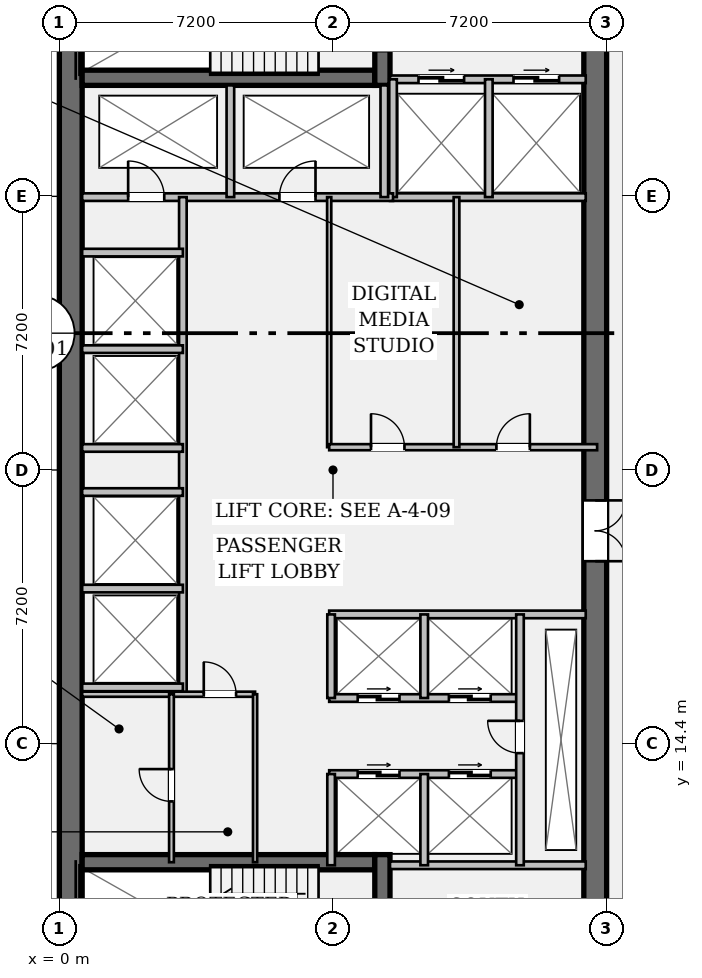
"""IFC4 building model, lengths in metres.
Left out: names, types, materials, properties, quantities, classifications, styles, units other than length and angle.
Written with IfcOpenShell. Run it as: python <this file> out.ifc"""

import sys

from ifc_helpers import new_model, si_unit, direction, frame, frame_2d, origin, place, context, subcontext, project, spatial, rectangle, extrude, element, fill, save


model = new_model("IFC4")
c1 = context("Model", 3, precision=1e-05, world=origin(), true_north=direction((0.0, 1.0)))
c2 = subcontext(c1, "Body", "Model", "MODEL_VIEW")
j1 = project(units=[si_unit("LENGTHUNIT", "METRE"), si_unit("PLANEANGLEUNIT", "RADIAN")], contexts=[c1])
p1 = place(None, origin())
s1 = spatial("IfcSite", under=j1, at=p1, CompositionType="ELEMENT")
p2 = place(p1, origin())
s2 = spatial("IfcBuilding", under=s1, at=p2, CompositionType="ELEMENT")
p3 = place(p2, frame((0.0, 0.0, 152.25)))
s3 = spatial("IfcBuildingStorey", under=s2, at=p3, CompositionType="ELEMENT", Elevation=152.25)
p4 = place(p3, frame((0.3, 7.2, 0.0), z_axis=(0.0, 0.0, 1.0), x_axis=(0.0, 1.0, 0.0)))
e1 = element("IfcWall", 1, at=p4, inside=s3, PredefinedType="SHEAR", context=c2, shape_type="SweptSolid", body=[
    extrude(rectangle(XDim=28.8, YDim=0.6, at=frame_2d((14.4, 0.0))), origin(), (0.0, 0.0, 1.0), 3.58),
])
p5 = place(p3, frame((14.1, 35.4, 0.0), z_axis=(0.0, 0.0, 1.0), x_axis=(0.0, -1.0, 0.0)))
e2 = element("IfcWall", 2, at=p5, inside=s3, PredefinedType="SHEAR", context=c2, shape_type="SweptSolid", body=[
    extrude(rectangle(XDim=27.6, YDim=0.6, at=frame_2d((13.8, 0.0))), origin(), (0.0, 0.0, 1.0), 3.58),
])
p6 = place(p5, frame((1.3, 0.0, 0.0)))
e3 = element("IfcOpeningElement", 3, at=p6, cuts=e2, PredefinedType="OPENING", context=c2, shape_type="SweptSolid", body=[
    extrude(rectangle(XDim=1.2, YDim=2.15, at=frame_2d((0.6, 1.075))), frame((0.0, 0.312, 0.0), z_axis=(0.0, -1.0, 0.0), x_axis=(1.0, 0.0, 0.0)), (0.0, 0.0, 1.0), 0.624),
])
p7 = place(p5, frame((25.25, 0.0, 0.0)))
e4 = element("IfcOpeningElement", 4, at=p7, cuts=e2, PredefinedType="OPENING", context=c2, shape_type="SweptSolid", body=[
    extrude(rectangle(XDim=1.2, YDim=2.15, at=frame_2d((0.6, 1.075))), frame((0.0, 0.312, 0.0), z_axis=(0.0, -1.0, 0.0), x_axis=(1.0, 0.0, 0.0)), (0.0, 0.0, 1.0), 0.624),
])
p8 = place(p5, frame((14.6, 0.0, 0.0)))
e5 = element("IfcOpeningElement", 5, at=p8, cuts=e2, PredefinedType="OPENING", context=c2, shape_type="SweptSolid", body=[
    extrude(rectangle(XDim=1.6, YDim=2.2, at=frame_2d((0.8, 1.1))), frame((0.0, 0.312, 0.0), z_axis=(0.0, -1.0, 0.0), x_axis=(1.0, 0.0, 0.0)), (0.0, 0.0, 1.0), 0.624),
])
for number, where, z_axis, x_axis in (
    (6, (0.6, 31.92, 0.0), (0.0, 0.0, 1.0), (1.0, 0.0, 0.0)),
    (7, (0.6, 11.28, 0.0), (0.0, 0.0, 1.0), (1.0, 0.0, 0.0)),
):
    element("IfcWall", number, at=place(p3, frame(where, z_axis=z_axis, x_axis=x_axis)), inside=s3, PredefinedType="SHEAR", context=c2, shape_type="SweptSolid", body=[
        extrude(rectangle(XDim=7.7, YDim=0.4, at=frame_2d((3.85, 0.0))), origin(), (0.0, 0.0, 1.0), 3.58),
    ])
p9 = place(p3, frame((8.5, 31.72, 0.0), z_axis=(0.0, 0.0, 1.0), x_axis=(0.0, 1.0, 0.0)))
e8 = element("IfcWall", 8, at=p9, inside=s3, PredefinedType="SHEAR", context=c2, shape_type="SweptSolid", body=[
    extrude(rectangle(XDim=3.68, YDim=0.4, at=frame_2d((1.84, 0.0))), origin(), (0.0, 0.0, 1.0), 3.58),
])
p10 = place(p9, frame((0.9, 0.0, 0.0)))
e9 = element("IfcOpeningElement", 9, at=p10, cuts=e8, PredefinedType="OPENING", context=c2, shape_type="SweptSolid", body=[
    extrude(rectangle(XDim=1.1, YDim=2.15, at=frame_2d((0.55, 1.075))), frame((0.0, 0.212, 0.0), z_axis=(0.0, -1.0, 0.0), x_axis=(1.0, 0.0, 0.0)), (0.0, 0.0, 1.0), 0.424),
])
p11 = place(p3, frame((8.5, 7.8, 0.0), z_axis=(0.0, 0.0, 1.0), x_axis=(0.0, 1.0, 0.0)))
e10 = element("IfcWall", 10, at=p11, inside=s3, PredefinedType="SHEAR", context=c2, shape_type="SweptSolid", body=[
    extrude(rectangle(XDim=3.68, YDim=0.4, at=frame_2d((1.84, 0.0))), origin(), (0.0, 0.0, 1.0), 3.58),
])
p12 = place(p11, frame((0.85, 0.0, 0.0)))
e11 = element("IfcOpeningElement", 11, at=p12, cuts=e10, PredefinedType="OPENING", context=c2, shape_type="SweptSolid", body=[
    extrude(rectangle(XDim=1.1, YDim=2.15, at=frame_2d((0.55, 1.075))), frame((0.0, 0.212, 0.0), z_axis=(0.0, -1.0, 0.0), x_axis=(1.0, 0.0, 0.0)), (0.0, 0.0, 1.0), 0.424),
])
p13 = place(p3, frame((8.7, 31.88, 0.0), z_axis=(0.0, 0.0, 1.0), x_axis=(1.0, 0.0, 0.0)))
e12 = element("IfcWall", 12, at=p13, inside=s3, PredefinedType="PARTITIONING", context=c2, shape_type="SweptSolid", body=[
    extrude(rectangle(XDim=5.15, YDim=0.2, at=frame_2d((2.575, 0.0))), origin(), (0.0, 0.0, 1.0), 3.58),
])
p14 = place(p13, frame((0.75, 0.0, 0.0)))
e13 = element("IfcOpeningElement", 13, at=p14, cuts=e12, PredefinedType="OPENING", context=c2, shape_type="SweptSolid", body=[
    extrude(rectangle(XDim=1.2, YDim=2.2, at=frame_2d((0.6, 1.1))), frame((0.0, 0.112, 0.0), z_axis=(0.0, -1.0, 0.0), x_axis=(1.0, 0.0, 0.0)), (0.0, 0.0, 1.0), 0.224),
])
p15 = place(p13, frame((3.25, 0.0, 0.0)))
e14 = element("IfcOpeningElement", 14, at=p15, cuts=e12, PredefinedType="OPENING", context=c2, shape_type="SweptSolid", body=[
    extrude(rectangle(XDim=1.2, YDim=2.2, at=frame_2d((0.6, 1.1))), frame((0.0, 0.112, 0.0), z_axis=(0.0, -1.0, 0.0), x_axis=(1.0, 0.0, 0.0)), (0.0, 0.0, 1.0), 0.224),
])
for number, where, z_axis, x_axis in (
    (15, (8.7, 11.2, 0.0), (0.0, 0.0, 1.0), (1.0, 0.0, 0.0)),
    (16, (8.7, 28.78, 0.0), (0.0, 0.0, 1.0), (1.0, 0.0, 0.0)),
):
    element("IfcWall", number, at=place(p3, frame(where, z_axis=z_axis, x_axis=x_axis)), inside=s3, PredefinedType="PARTITIONING", context=c2, shape_type="SweptSolid", body=[
        extrude(rectangle(XDim=5.15, YDim=0.2, at=frame_2d((2.575, 0.0))), origin(), (0.0, 0.0, 1.0), 3.58),
    ])
for number, where, z_axis, x_axis in (
    (17, (8.78, 28.78, 0.0), (0.0, 0.0, 1.0), (0.0, 1.0, 0.0)),
    (18, (11.3, 28.78, 0.0), (0.0, 0.0, 1.0), (0.0, 1.0, 0.0)),
):
    element("IfcWall", number, at=place(p3, frame(where, z_axis=z_axis, x_axis=x_axis)), inside=s3, PredefinedType="PARTITIONING", context=c2, shape_type="SweptSolid", body=[
        extrude(rectangle(XDim=3.1, YDim=0.2, at=frame_2d((1.55, 0.0))), origin(), (0.0, 0.0, 1.0), 3.58),
    ])
p16 = place(p3, frame((0.6, 28.78, 0.0), z_axis=(0.0, 0.0, 1.0), x_axis=(1.0, 0.0, 0.0)))
e19 = element("IfcWall", 19, at=p16, inside=s3, PredefinedType="PARTITIONING", context=c2, shape_type="SweptSolid", body=[
    extrude(rectangle(XDim=8.18, YDim=0.2, at=frame_2d((4.09, 0.0))), origin(), (0.0, 0.0, 1.0), 3.58),
])
p17 = place(p16, frame((1.21, 0.0, 0.0)))
e20 = element("IfcOpeningElement", 20, at=p17, cuts=e19, PredefinedType="OPENING", context=c2, shape_type="SweptSolid", body=[
    extrude(rectangle(XDim=0.95, YDim=2.15, at=frame_2d((0.475, 1.075))), frame((0.0, 0.112, 0.0), z_axis=(0.0, -1.0, 0.0), x_axis=(1.0, 0.0, 0.0)), (0.0, 0.0, 1.0), 0.224),
])
p18 = place(p16, frame((5.19, 0.0, 0.0)))
e21 = element("IfcOpeningElement", 21, at=p18, cuts=e19, PredefinedType="OPENING", context=c2, shape_type="SweptSolid", body=[
    extrude(rectangle(XDim=0.95, YDim=2.15, at=frame_2d((0.475, 1.075))), frame((0.0, 0.112, 0.0), z_axis=(0.0, -1.0, 0.0), x_axis=(1.0, 0.0, 0.0)), (0.0, 0.0, 1.0), 0.224),
])
for number, where, z_axis, x_axis in (
    (22, (4.5, 28.78, 0.0), (0.0, 0.0, 1.0), (0.0, 1.0, 0.0)),
    (23, (8.55, 28.78, 0.0), (0.0, 0.0, 1.0), (0.0, 1.0, 0.0)),
):
    element("IfcWall", number, at=place(p3, frame(where, z_axis=z_axis, x_axis=x_axis)), inside=s3, PredefinedType="PARTITIONING", context=c2, shape_type="SweptSolid", body=[
        extrude(rectangle(XDim=2.94, YDim=0.2, at=frame_2d((1.47, 0.0))), origin(), (0.0, 0.0, 1.0), 3.58),
    ])
p19 = place(p3, frame((3.25, 15.7, 0.0), z_axis=(0.0, 0.0, 1.0), x_axis=(0.0, 1.0, 0.0)))
e24 = element("IfcWall", 24, at=p19, inside=s3, PredefinedType="PARTITIONING", context=c2, shape_type="SweptSolid", body=[
    extrude(rectangle(XDim=13.08, YDim=0.2, at=frame_2d((6.54, 0.0))), origin(), (0.0, 0.0, 1.0), 3.58),
])
for number, where, z_axis, x_axis in (
    (25, (0.6, 15.88, 0.0), (0.0, 0.0, 1.0), (1.0, 0.0, 0.0)),
    (26, (0.6, 18.48, 0.0), (0.0, 0.0, 1.0), (1.0, 0.0, 0.0)),
    (27, (0.6, 22.18, 0.0), (0.0, 0.0, 1.0), (1.0, 0.0, 0.0)),
    (28, (0.6, 24.78, 0.0), (0.0, 0.0, 1.0), (1.0, 0.0, 0.0)),
    (29, (0.6, 21.02, 0.0), (0.0, 0.0, 1.0), (1.0, 0.0, 0.0)),
    (30, (0.6, 27.32, 0.0), (0.0, 0.0, 1.0), (1.0, 0.0, 0.0)),
):
    element("IfcWall", number, at=place(p3, frame(where, z_axis=z_axis, x_axis=x_axis)), inside=s3, PredefinedType="PARTITIONING", context=c2, shape_type="SweptSolid", body=[
        extrude(rectangle(XDim=2.65, YDim=0.2, at=frame_2d((1.325, 0.0))), origin(), (0.0, 0.0, 1.0), 3.58),
    ])
p20 = place(p3, frame((7.1, 22.2, 0.0), z_axis=(0.0, 0.0, 1.0), x_axis=(0.0, 1.0, 0.0)))
e31 = element("IfcWall", 31, at=p20, inside=s3, PredefinedType="PARTITIONING", context=c2, shape_type="SweptSolid", body=[
    extrude(rectangle(XDim=6.58, YDim=0.11, at=frame_2d((3.29, 0.0))), origin(), (0.0, 0.0, 1.0), 3.58),
])
p21 = place(p3, frame((7.1, 22.2, 0.0), z_axis=(0.0, 0.0, 1.0), x_axis=(1.0, 0.0, 0.0)))
e32 = element("IfcWall", 32, at=p21, inside=s3, PredefinedType="PARTITIONING", context=c2, shape_type="SweptSolid", body=[
    extrude(rectangle(XDim=7.05, YDim=0.16, at=frame_2d((3.525, 0.0))), origin(), (0.0, 0.0, 1.0), 3.58),
])
p22 = place(p21, frame((1.1, 0.0, 0.0)))
e33 = element("IfcOpeningElement", 33, at=p22, cuts=e32, PredefinedType="OPENING", context=c2, shape_type="SweptSolid", body=[
    extrude(rectangle(XDim=0.88, YDim=2.15, at=frame_2d((0.44, 1.075))), frame((0.0, 0.092, 0.0), z_axis=(0.0, -1.0, 0.0), x_axis=(1.0, 0.0, 0.0)), (0.0, 0.0, 1.0), 0.184),
])
p23 = place(p21, frame((4.4, 0.0, 0.0)))
e34 = element("IfcOpeningElement", 34, at=p23, cuts=e32, PredefinedType="OPENING", context=c2, shape_type="SweptSolid", body=[
    extrude(rectangle(XDim=0.88, YDim=2.15, at=frame_2d((0.44, 1.075))), frame((0.0, 0.092, 0.0), z_axis=(0.0, -1.0, 0.0), x_axis=(1.0, 0.0, 0.0)), (0.0, 0.0, 1.0), 0.184),
])
p24 = place(p3, frame((10.45, 22.2, 0.0), z_axis=(0.0, 0.0, 1.0), x_axis=(0.0, 1.0, 0.0)))
e35 = element("IfcWall", 35, at=p24, inside=s3, PredefinedType="PARTITIONING", context=c2, shape_type="SweptSolid", body=[
    extrude(rectangle(XDim=6.58, YDim=0.15, at=frame_2d((3.29, 0.0))), origin(), (0.0, 0.0, 1.0), 3.58),
])
p25 = place(p3, frame((7.1, 17.8, 0.0), z_axis=(0.0, 0.0, 1.0), x_axis=(1.0, 0.0, 0.0)))
e36 = element("IfcWall", 36, at=p25, inside=s3, PredefinedType="PARTITIONING", context=c2, shape_type="SweptSolid", body=[
    extrude(rectangle(XDim=6.75, YDim=0.2, at=frame_2d((3.375, 0.0))), origin(), (0.0, 0.0, 1.0), 3.58),
])
p26 = place(p3, frame((7.1, 15.6, 0.0), z_axis=(0.0, 0.0, 1.0), x_axis=(1.0, 0.0, 0.0)))
e37 = element("IfcWall", 37, at=p26, inside=s3, PredefinedType="PARTITIONING", context=c2, shape_type="SweptSolid", body=[
    extrude(rectangle(XDim=5.02, YDim=0.2, at=frame_2d((2.51, 0.0))), origin(), (0.0, 0.0, 1.0), 3.58),
])
p27 = place(p26, frame((0.75, 0.0, 0.0)))
e38 = element("IfcOpeningElement", 38, at=p27, cuts=e37, PredefinedType="OPENING", context=c2, shape_type="SweptSolid", body=[
    extrude(rectangle(XDim=1.1, YDim=2.2, at=frame_2d((0.55, 1.1))), frame((0.0, 0.112, 0.0), z_axis=(0.0, -1.0, 0.0), x_axis=(1.0, 0.0, 0.0)), (0.0, 0.0, 1.0), 0.224),
])
p28 = place(p26, frame((3.15, 0.0, 0.0)))
e39 = element("IfcOpeningElement", 39, at=p28, cuts=e37, PredefinedType="OPENING", context=c2, shape_type="SweptSolid", body=[
    extrude(rectangle(XDim=1.1, YDim=2.2, at=frame_2d((0.55, 1.1))), frame((0.0, 0.112, 0.0), z_axis=(0.0, -1.0, 0.0), x_axis=(1.0, 0.0, 0.0)), (0.0, 0.0, 1.0), 0.224),
])
p29 = place(p3, frame((7.1, 13.6, 0.0), z_axis=(0.0, 0.0, 1.0), x_axis=(1.0, 0.0, 0.0)))
e40 = element("IfcWall", 40, at=p29, inside=s3, PredefinedType="PARTITIONING", context=c2, shape_type="SweptSolid", body=[
    extrude(rectangle(XDim=5.02, YDim=0.2, at=frame_2d((2.51, 0.0))), origin(), (0.0, 0.0, 1.0), 3.58),
])
p30 = place(p29, frame((0.75, 0.0, 0.0)))
e41 = element("IfcOpeningElement", 41, at=p30, cuts=e40, PredefinedType="OPENING", context=c2, shape_type="SweptSolid", body=[
    extrude(rectangle(XDim=1.1, YDim=2.2, at=frame_2d((0.55, 1.1))), frame((0.0, 0.112, 0.0), z_axis=(0.0, -1.0, 0.0), x_axis=(1.0, 0.0, 0.0)), (0.0, 0.0, 1.0), 0.224),
])
p31 = place(p29, frame((3.15, 0.0, 0.0)))
e42 = element("IfcOpeningElement", 42, at=p31, cuts=e40, PredefinedType="OPENING", context=c2, shape_type="SweptSolid", body=[
    extrude(rectangle(XDim=1.1, YDim=2.2, at=frame_2d((0.55, 1.1))), frame((0.0, 0.112, 0.0), z_axis=(0.0, -1.0, 0.0), x_axis=(1.0, 0.0, 0.0)), (0.0, 0.0, 1.0), 0.224),
])
p32 = place(p3, frame((7.15, 15.6, 0.0), z_axis=(0.0, 0.0, 1.0), x_axis=(0.0, 1.0, 0.0)))
e43 = element("IfcWall", 43, at=p32, inside=s3, PredefinedType="PARTITIONING", context=c2, shape_type="SweptSolid", body=[
    extrude(rectangle(XDim=2.2, YDim=0.2, at=frame_2d((1.1, 0.0))), origin(), (0.0, 0.0, 1.0), 3.58),
])
p33 = place(p3, frame((7.15, 11.2, 0.0), z_axis=(0.0, 0.0, 1.0), x_axis=(0.0, 1.0, 0.0)))
e44 = element("IfcWall", 44, at=p33, inside=s3, PredefinedType="PARTITIONING", context=c2, shape_type="SweptSolid", body=[
    extrude(rectangle(XDim=2.4, YDim=0.2, at=frame_2d((1.2, 0.0))), origin(), (0.0, 0.0, 1.0), 3.58),
])
p34 = place(p3, frame((9.6, 15.6, 0.0), z_axis=(0.0, 0.0, 1.0), x_axis=(0.0, 1.0, 0.0)))
e45 = element("IfcWall", 45, at=p34, inside=s3, PredefinedType="PARTITIONING", context=c2, shape_type="SweptSolid", body=[
    extrude(rectangle(XDim=2.2, YDim=0.2, at=frame_2d((1.1, 0.0))), origin(), (0.0, 0.0, 1.0), 3.58),
])
p35 = place(p3, frame((9.6, 11.2, 0.0), z_axis=(0.0, 0.0, 1.0), x_axis=(0.0, 1.0, 0.0)))
e46 = element("IfcWall", 46, at=p35, inside=s3, PredefinedType="PARTITIONING", context=c2, shape_type="SweptSolid", body=[
    extrude(rectangle(XDim=2.4, YDim=0.2, at=frame_2d((1.2, 0.0))), origin(), (0.0, 0.0, 1.0), 3.58),
])
p36 = place(p3, frame((12.12, 11.2, 0.0), z_axis=(0.0, 0.0, 1.0), x_axis=(0.0, 1.0, 0.0)))
e47 = element("IfcWall", 47, at=p36, inside=s3, PredefinedType="PARTITIONING", context=c2, shape_type="SweptSolid", body=[
    extrude(rectangle(XDim=6.6, YDim=0.2, at=frame_2d((3.3, 0.0))), origin(), (0.0, 0.0, 1.0), 3.58),
])
p37 = place(p36, frame((2.95, 0.0, 0.0)))
e48 = element("IfcOpeningElement", 48, at=p37, cuts=e47, PredefinedType="OPENING", context=c2, shape_type="SweptSolid", body=[
    extrude(rectangle(XDim=0.85, YDim=2.15, at=frame_2d((0.425, 1.075))), frame((0.0, 0.112, 0.0), z_axis=(0.0, -1.0, 0.0), x_axis=(1.0, 0.0, 0.0)), (0.0, 0.0, 1.0), 0.224),
])
p38 = place(p3, frame((0.6, 15.7, 0.0), z_axis=(0.0, 0.0, 1.0), x_axis=(1.0, 0.0, 0.0)))
e49 = element("IfcWall", 49, at=p38, inside=s3, PredefinedType="PARTITIONING", context=c2, shape_type="SweptSolid", body=[
    extrude(rectangle(XDim=4.55, YDim=0.135, at=frame_2d((2.275, 0.0))), origin(), (0.0, 0.0, 1.0), 3.58),
])
p39 = place(p38, frame((3.2, 0.0, 0.0)))
e50 = element("IfcOpeningElement", 50, at=p39, cuts=e49, PredefinedType="OPENING", context=c2, shape_type="SweptSolid", body=[
    extrude(rectangle(XDim=0.85, YDim=2.15, at=frame_2d((0.425, 1.075))), frame((0.0, 0.08, 0.0), z_axis=(0.0, -1.0, 0.0), x_axis=(1.0, 0.0, 0.0)), (0.0, 0.0, 1.0), 0.159),
])
p40 = place(p3, frame((5.15, 11.28, 0.0), z_axis=(0.0, 0.0, 1.0), x_axis=(0.0, 1.0, 0.0)))
e51 = element("IfcWall", 51, at=p40, inside=s3, PredefinedType="PARTITIONING", context=c2, shape_type="SweptSolid", body=[
    extrude(rectangle(XDim=4.42, YDim=0.11, at=frame_2d((2.21, 0.0))), origin(), (0.0, 0.0, 1.0), 3.58),
])
p41 = place(p3, frame((2.95, 11.28, 0.0), z_axis=(0.0, 0.0, 1.0), x_axis=(0.0, 1.0, 0.0)))
e52 = element("IfcWall", 52, at=p41, inside=s3, PredefinedType="PARTITIONING", context=c2, shape_type="SweptSolid", body=[
    extrude(rectangle(XDim=4.42, YDim=0.125, at=frame_2d((2.21, 0.0))), origin(), (0.0, 0.0, 1.0), 3.58),
])
p42 = place(p41, frame((1.6, 0.0, 0.0)))
e53 = element("IfcOpeningElement", 53, at=p42, cuts=e52, PredefinedType="OPENING", context=c2, shape_type="SweptSolid", body=[
    extrude(rectangle(XDim=0.85, YDim=2.15, at=frame_2d((0.425, 1.075))), frame((0.0, 0.074, 0.0), z_axis=(0.0, -1.0, 0.0), x_axis=(1.0, 0.0, 0.0)), (0.0, 0.0, 1.0), 0.149),
])
p43 = place(p14, origin())
e54 = element("IfcDoor", 54, at=p43, inside=s3, OperationType="DOUBLE_DOOR_SLIDING", PredefinedType="DOOR", context=c2, shape_type="SweptSolid", body=[
    extrude(rectangle(XDim=1.2, YDim=2.2, at=frame_2d((0.6, 1.1))), frame((0.0, 0.025, 0.0), z_axis=(0.0, -1.0, 0.0), x_axis=(1.0, 0.0, 0.0)), (0.0, 0.0, 1.0), 0.05),
])
fill(e13, e54)
p44 = place(p15, origin())
e55 = element("IfcDoor", 55, at=p44, inside=s3, OperationType="DOUBLE_DOOR_SLIDING", PredefinedType="DOOR", context=c2, shape_type="SweptSolid", body=[
    extrude(rectangle(XDim=1.2, YDim=2.2, at=frame_2d((0.6, 1.1))), frame((0.0, 0.025, 0.0), z_axis=(0.0, -1.0, 0.0), x_axis=(1.0, 0.0, 0.0)), (0.0, 0.0, 1.0), 0.05),
])
fill(e14, e55)
p45 = place(p17, origin())
e56 = element("IfcDoor", 56, at=p45, inside=s3, OperationType="SINGLE_SWING_LEFT", PredefinedType="DOOR", context=c2, shape_type="SweptSolid", body=[
    extrude(rectangle(XDim=0.95, YDim=2.15, at=frame_2d((0.475, 1.075))), frame((0.0, 0.025, 0.0), z_axis=(0.0, -1.0, 0.0), x_axis=(1.0, 0.0, 0.0)), (0.0, 0.0, 1.0), 0.05),
])
fill(e20, e56)
p46 = place(p18, origin())
e57 = element("IfcDoor", 57, at=p46, inside=s3, OperationType="SINGLE_SWING_RIGHT", PredefinedType="DOOR", context=c2, shape_type="SweptSolid", body=[
    extrude(rectangle(XDim=0.95, YDim=2.15, at=frame_2d((0.475, 1.075))), frame((0.0, 0.025, 0.0), z_axis=(0.0, -1.0, 0.0), x_axis=(1.0, 0.0, 0.0)), (0.0, 0.0, 1.0), 0.05),
])
fill(e21, e57)
p47 = place(p8, origin())
e58 = element("IfcDoor", 58, at=p47, inside=s3, OperationType="DOUBLE_DOOR_SINGLE_SWING", PredefinedType="DOOR", context=c2, shape_type="SweptSolid", body=[
    extrude(rectangle(XDim=1.6, YDim=2.2, at=frame_2d((0.8, 1.1))), frame((0.0, 0.025, 0.0), z_axis=(0.0, -1.0, 0.0), x_axis=(1.0, 0.0, 0.0)), (0.0, 0.0, 1.0), 0.05),
])
fill(e5, e58)
p48 = place(p22, origin())
e59 = element("IfcDoor", 59, at=p48, inside=s3, OperationType="SINGLE_SWING_LEFT", PredefinedType="DOOR", context=c2, shape_type="SweptSolid", body=[
    extrude(rectangle(XDim=0.88, YDim=2.15, at=frame_2d((0.44, 1.075))), frame((0.0, 0.025, 0.0), z_axis=(0.0, -1.0, 0.0), x_axis=(1.0, 0.0, 0.0)), (0.0, 0.0, 1.0), 0.05),
])
fill(e33, e59)
p49 = place(p23, origin())
e60 = element("IfcDoor", 60, at=p49, inside=s3, OperationType="SINGLE_SWING_RIGHT", PredefinedType="DOOR", context=c2, shape_type="SweptSolid", body=[
    extrude(rectangle(XDim=0.88, YDim=2.15, at=frame_2d((0.44, 1.075))), frame((0.0, 0.025, 0.0), z_axis=(0.0, -1.0, 0.0), x_axis=(1.0, 0.0, 0.0)), (0.0, 0.0, 1.0), 0.05),
])
fill(e34, e60)
p50 = place(p37, origin())
e61 = element("IfcDoor", 61, at=p50, inside=s3, OperationType="SINGLE_SWING_RIGHT", PredefinedType="DOOR", context=c2, shape_type="SweptSolid", body=[
    extrude(rectangle(XDim=0.85, YDim=2.15, at=frame_2d((0.425, 1.075))), frame((0.0, 0.025, 0.0), z_axis=(0.0, -1.0, 0.0), x_axis=(1.0, 0.0, 0.0)), (0.0, 0.0, 1.0), 0.05),
])
fill(e48, e61)
p51 = place(p27, origin())
e62 = element("IfcDoor", 62, at=p51, inside=s3, OperationType="DOUBLE_DOOR_SLIDING", PredefinedType="DOOR", context=c2, shape_type="SweptSolid", body=[
    extrude(rectangle(XDim=1.1, YDim=2.2, at=frame_2d((0.55, 1.1))), frame((0.0, 0.025, 0.0), z_axis=(0.0, -1.0, 0.0), x_axis=(1.0, 0.0, 0.0)), (0.0, 0.0, 1.0), 0.05),
])
fill(e38, e62)
p52 = place(p28, origin())
e63 = element("IfcDoor", 63, at=p52, inside=s3, OperationType="DOUBLE_DOOR_SLIDING", PredefinedType="DOOR", context=c2, shape_type="SweptSolid", body=[
    extrude(rectangle(XDim=1.1, YDim=2.2, at=frame_2d((0.55, 1.1))), frame((0.0, 0.025, 0.0), z_axis=(0.0, -1.0, 0.0), x_axis=(1.0, 0.0, 0.0)), (0.0, 0.0, 1.0), 0.05),
])
fill(e39, e63)
p53 = place(p30, origin())
e64 = element("IfcDoor", 64, at=p53, inside=s3, OperationType="DOUBLE_DOOR_SLIDING", PredefinedType="DOOR", context=c2, shape_type="SweptSolid", body=[
    extrude(rectangle(XDim=1.1, YDim=2.2, at=frame_2d((0.55, 1.1))), frame((0.0, 0.025, 0.0), z_axis=(0.0, -1.0, 0.0), x_axis=(1.0, 0.0, 0.0)), (0.0, 0.0, 1.0), 0.05),
])
fill(e41, e64)
p54 = place(p31, origin())
e65 = element("IfcDoor", 65, at=p54, inside=s3, OperationType="DOUBLE_DOOR_SLIDING", PredefinedType="DOOR", context=c2, shape_type="SweptSolid", body=[
    extrude(rectangle(XDim=1.1, YDim=2.2, at=frame_2d((0.55, 1.1))), frame((0.0, 0.025, 0.0), z_axis=(0.0, -1.0, 0.0), x_axis=(1.0, 0.0, 0.0)), (0.0, 0.0, 1.0), 0.05),
])
fill(e42, e65)
p55 = place(p39, origin())
e66 = element("IfcDoor", 66, at=p55, inside=s3, OperationType="SINGLE_SWING_LEFT", PredefinedType="DOOR", context=c2, shape_type="SweptSolid", body=[
    extrude(rectangle(XDim=0.85, YDim=2.15, at=frame_2d((0.425, 1.075))), frame((0.0, 0.025, 0.0), z_axis=(0.0, -1.0, 0.0), x_axis=(1.0, 0.0, 0.0)), (0.0, 0.0, 1.0), 0.05),
])
fill(e50, e66)
p56 = place(p42, origin())
e67 = element("IfcDoor", 67, at=p56, inside=s3, OperationType="SINGLE_SWING_RIGHT", PredefinedType="DOOR", context=c2, shape_type="SweptSolid", body=[
    extrude(rectangle(XDim=0.85, YDim=2.15, at=frame_2d((0.425, 1.075))), frame((0.0, 0.025, 0.0), z_axis=(0.0, -1.0, 0.0), x_axis=(1.0, 0.0, 0.0)), (0.0, 0.0, 1.0), 0.05),
])
fill(e53, e67)
save(model, sys.argv[1])
